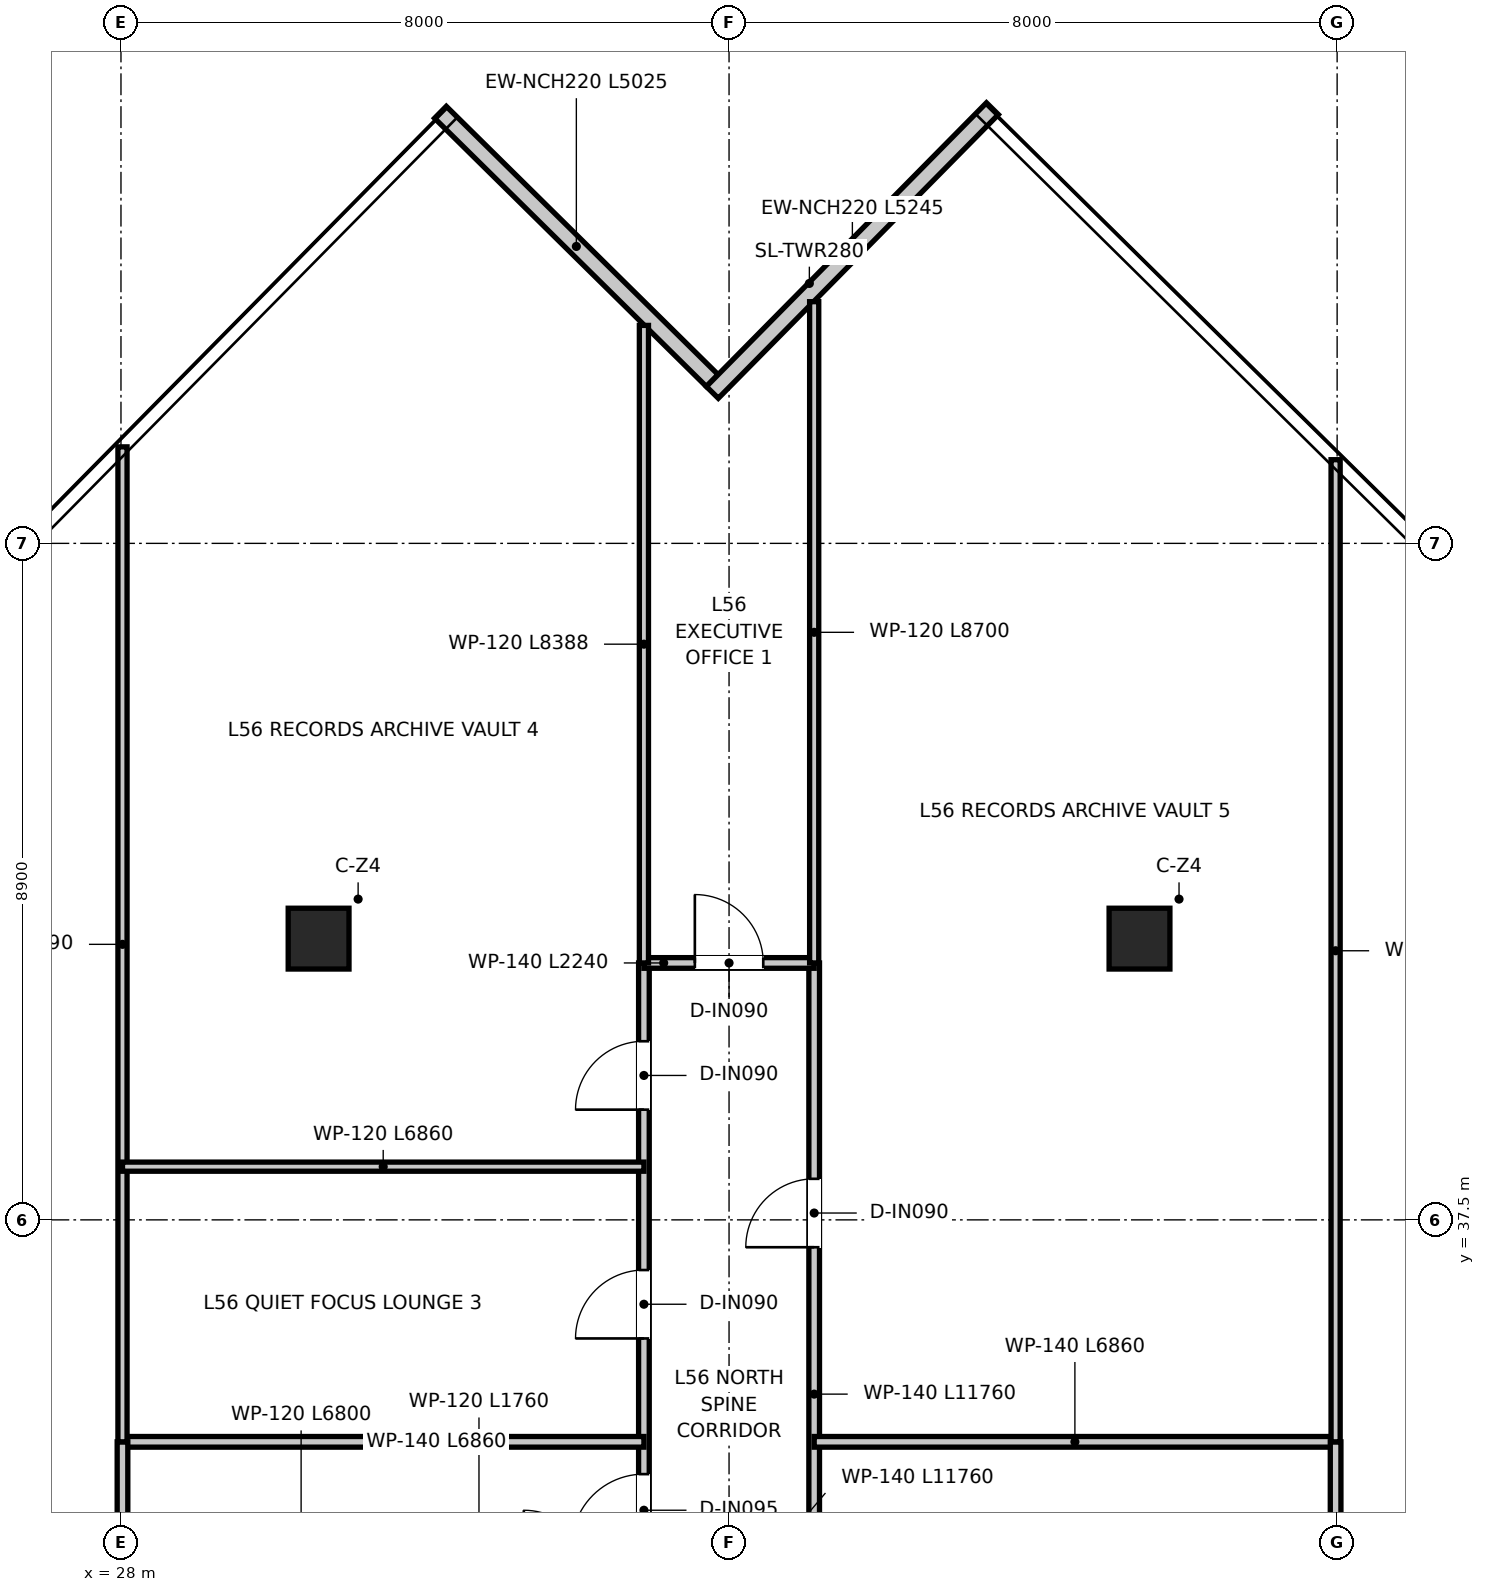
"""IFC4 building model, lengths in metres.
Left out: names, types, materials, properties, quantities, classifications, styles, units other than length and angle.
Written with IfcOpenShell. Run it as: python <this file> out.ifc"""

import sys

from ifc_helpers import new_model, si_unit, direction, frame, frame_2d, origin, origin_2d, place, context, subcontext, project, spatial, rectangle, extrude, source, transform, mapped, element, fill, save


model = new_model("IFC4")
c1 = context("Model", 3, precision=1e-05, world=origin(), true_north=direction((0.0, 1.0)))
c2 = subcontext(c1, "Body", "Model", "MODEL_VIEW")
j1 = project(units=[si_unit("LENGTHUNIT", "METRE"), si_unit("PLANEANGLEUNIT", "RADIAN")], contexts=[c1])
p1 = place(None, origin())
s1 = spatial("IfcSite", under=j1, at=p1, CompositionType="ELEMENT")
p2 = place(p1, origin())
s2 = spatial("IfcBuilding", under=s1, at=p2, CompositionType="ELEMENT")
p3 = place(p2, frame((0.0, 0.0, 231.0)))
s3 = spatial("IfcBuildingStorey", under=s2, at=p3, CompositionType="ELEMENT", Elevation=231.0)
m1 = source(origin(), c2, "Body", "SweptSolid", [
    extrude(rectangle(XDim=0.8, YDim=0.8, at=origin_2d()), origin(), (0.0, 0.0, 1.0), 3.95),
])
for number, where, z_axis, x_axis in (
    (1, (30.6, 41.2, 0.0), (0.0, 0.0, 1.0), (1.0, 0.0, 0.0)),
    (2, (41.4, 41.2, 0.0), (0.0, 0.0, 1.0), (1.0, 0.0, 0.0)),
):
    element("IfcColumn", number, at=place(p3, frame(where, z_axis=z_axis, x_axis=x_axis)), inside=s3, PredefinedType="COLUMN", context=c2, shape_type="MappedRepresentation", body=[
        mapped(m1, transform((0.0, 0.0, 0.0), x_axis=(1.0, 0.0, 0.0), y_axis=(0.0, 1.0, 0.0), z_axis=(0.0, 0.0, 1.0), scale=1.0)),
    ])
p4 = place(p3, frame((35.779, 48.542, 0.0), z_axis=(0.0, 0.0, 1.0), x_axis=(-0.711707198953, 0.70247623658, 0.0)))
e3 = element("IfcWall", 3, at=p4, inside=s3, PredefinedType="ELEMENTEDWALL", context=c2, shape_type="SweptSolid", body=[
    extrude(rectangle(XDim=5.025, YDim=0.22, at=frame_2d((2.513, 0.0))), origin(), (0.0, 0.0, 1.0), 3.67),
])
p5 = place(p3, frame((39.465, 52.119, 0.0), z_axis=(0.0, 0.0, 1.0), x_axis=(-0.702460059039, -0.711723166305, 0.0)))
e4 = element("IfcWall", 4, at=p5, inside=s3, PredefinedType="ELEMENTEDWALL", context=c2, shape_type="SweptSolid", body=[
    extrude(rectangle(XDim=5.245, YDim=0.22, at=frame_2d((2.623, 0.0))), origin(), (0.0, 0.0, 1.0), 3.67),
])
p6 = place(p3, frame((34.88, 29.12, 0.0), z_axis=(0.0, 0.0, 1.0), x_axis=(0.0, 1.0, 0.0)))
e5 = element("IfcWall", 5, at=p6, inside=s3, PredefinedType="PARTITIONING", context=c2, shape_type="SweptSolid", body=[
    extrude(rectangle(XDim=11.76, YDim=0.14, at=frame_2d((5.88, 0.0))), origin(), (0.0, 0.0, 1.0), 3.03),
])
p7 = place(p6, frame((4.085, 0.0, 0.0)))
e6 = element("IfcOpeningElement", 6, at=p7, cuts=e5, PredefinedType="OPENING", context=c2, shape_type="SweptSolid", body=[
    extrude(rectangle(XDim=0.95, YDim=2.1, at=frame_2d((0.475, 1.05))), frame((0.0, 0.08, 0.0), z_axis=(0.0, -1.0, 0.0), x_axis=(1.0, 0.0, 0.0)), (0.0, 0.0, 1.0), 0.16),
])
p8 = place(p6, frame((6.82, 0.0, 0.0)))
e7 = element("IfcOpeningElement", 7, at=p8, cuts=e5, PredefinedType="OPENING", context=c2, shape_type="SweptSolid", body=[
    extrude(rectangle(XDim=0.9, YDim=2.1, at=frame_2d((0.45, 1.05))), frame((0.0, 0.08, 0.0), z_axis=(0.0, -1.0, 0.0), x_axis=(1.0, 0.0, 0.0)), (0.0, 0.0, 1.0), 0.16),
])
p9 = place(p6, frame((9.83, 0.0, 0.0)))
e8 = element("IfcOpeningElement", 8, at=p9, cuts=e5, PredefinedType="OPENING", context=c2, shape_type="SweptSolid", body=[
    extrude(rectangle(XDim=0.9, YDim=2.1, at=frame_2d((0.45, 1.05))), frame((0.0, 0.08, 0.0), z_axis=(0.0, -1.0, 0.0), x_axis=(1.0, 0.0, 0.0)), (0.0, 0.0, 1.0), 0.16),
])
p10 = place(p3, frame((37.12, 29.12, 0.0), z_axis=(0.0, 0.0, 1.0), x_axis=(0.0, 1.0, 0.0)))
e9 = element("IfcWall", 9, at=p10, inside=s3, PredefinedType="PARTITIONING", context=c2, shape_type="SweptSolid", body=[
    extrude(rectangle(XDim=11.76, YDim=0.14, at=frame_2d((5.88, 0.0))), origin(), (0.0, 0.0, 1.0), 3.03),
])
p11 = place(p10, frame((3.205, 0.0, 0.0)))
e10 = element("IfcOpeningElement", 10, at=p11, cuts=e9, PredefinedType="OPENING", context=c2, shape_type="SweptSolid", body=[
    extrude(rectangle(XDim=0.95, YDim=2.1, at=frame_2d((0.475, 1.05))), frame((0.0, 0.08, 0.0), z_axis=(0.0, -1.0, 0.0), x_axis=(1.0, 0.0, 0.0)), (0.0, 0.0, 1.0), 0.16),
])
p12 = place(p10, frame((8.02, 0.0, 0.0)))
e11 = element("IfcOpeningElement", 11, at=p12, cuts=e9, PredefinedType="OPENING", context=c2, shape_type="SweptSolid", body=[
    extrude(rectangle(XDim=0.9, YDim=2.1, at=frame_2d((0.45, 1.05))), frame((0.0, 0.08, 0.0), z_axis=(0.0, -1.0, 0.0), x_axis=(1.0, 0.0, 0.0)), (0.0, 0.0, 1.0), 0.16),
])
p13 = place(p3, frame((34.88, 40.88, 0.0), z_axis=(0.0, 0.0, 1.0), x_axis=(1.0, 0.0, 0.0)))
e12 = element("IfcWall", 12, at=p13, inside=s3, PredefinedType="PARTITIONING", context=c2, shape_type="SweptSolid", body=[
    extrude(rectangle(XDim=2.24, YDim=0.14, at=frame_2d((1.12, 0.0))), origin(), (0.0, 0.0, 1.0), 3.67),
])
p14 = place(p13, frame((0.67, 0.0, 0.0)))
e13 = element("IfcOpeningElement", 13, at=p14, cuts=e12, PredefinedType="OPENING", context=c2, shape_type="SweptSolid", body=[
    extrude(rectangle(XDim=0.9, YDim=2.1, at=frame_2d((0.45, 1.05))), frame((0.0, 0.08, 0.0), z_axis=(0.0, -1.0, 0.0), x_axis=(1.0, 0.0, 0.0)), (0.0, 0.0, 1.0), 0.16),
])
for number, where, z_axis, x_axis in (
    (14, (28.02, 34.58, 0.0), (0.0, 0.0, 1.0), (1.0, 0.0, 0.0)),
    (15, (37.12, 34.58, 0.0), (0.0, 0.0, 1.0), (1.0, 0.0, 0.0)),
):
    element("IfcWall", number, at=place(p3, frame(where, z_axis=z_axis, x_axis=x_axis)), inside=s3, PredefinedType="PARTITIONING", context=c2, shape_type="SweptSolid", body=[
        extrude(rectangle(XDim=6.86, YDim=0.14, at=frame_2d((3.43, 0.0))), origin(), (0.0, 0.0, 1.0), 3.18),
    ])
for number, where, z_axis, x_axis in (
    (16, (28.02, 29.12, 0.0), (0.0, 0.0, 1.0), (0.0, 1.0, 0.0)),
    (17, (43.98, 29.12, 0.0), (0.0, 0.0, 1.0), (0.0, 1.0, 0.0)),
):
    element("IfcWall", number, at=place(p3, frame(where, z_axis=z_axis, x_axis=x_axis)), inside=s3, PredefinedType="PARTITIONING", context=c2, shape_type="SweptSolid", body=[
        extrude(rectangle(XDim=5.46, YDim=0.14, at=frame_2d((2.73, 0.0))), origin(), (0.0, 0.0, 1.0), 3.37),
    ])
p15 = place(p3, frame((34.88, 40.88, 0.0), z_axis=(0.0, 0.0, 1.0), x_axis=(0.0, 1.0, 0.0)))
e18 = element("IfcWall", 18, at=p15, inside=s3, PredefinedType="PARTITIONING", context=c2, shape_type="SweptSolid", body=[
    extrude(rectangle(XDim=8.388, YDim=0.12, at=frame_2d((4.194, 0.0))), origin(), (0.0, 0.0, 1.0), 3.28),
])
p16 = place(p3, frame((37.12, 40.88, 0.0), z_axis=(0.0, 0.0, 1.0), x_axis=(0.0, 1.0, 0.0)))
e19 = element("IfcWall", 19, at=p16, inside=s3, PredefinedType="PARTITIONING", context=c2, shape_type="SweptSolid", body=[
    extrude(rectangle(XDim=8.7, YDim=0.12, at=frame_2d((4.35, 0.0))), origin(), (0.0, 0.0, 1.0), 3.28),
])
p17 = place(p3, frame((28.02, 34.58, 0.0), z_axis=(0.0, 0.0, 1.0), x_axis=(0.0, 1.0, 0.0)))
e20 = element("IfcWall", 20, at=p17, inside=s3, PredefinedType="PARTITIONING", context=c2, shape_type="SweptSolid", body=[
    extrude(rectangle(XDim=13.09, YDim=0.12, at=frame_2d((6.545, 0.0))), origin(), (0.0, 0.0, 1.0), 3.03),
])
p18 = place(p3, frame((43.98, 34.58, 0.0), z_axis=(0.0, 0.0, 1.0), x_axis=(0.0, 1.0, 0.0)))
e21 = element("IfcWall", 21, at=p18, inside=s3, PredefinedType="PARTITIONING", context=c2, shape_type="SweptSolid", body=[
    extrude(rectangle(XDim=12.921, YDim=0.12, at=frame_2d((6.46, 0.0))), origin(), (0.0, 0.0, 1.0), 3.03),
])
p19 = place(p3, frame((28.02, 38.2, 0.0), z_axis=(0.0, 0.0, 1.0), x_axis=(1.0, 0.0, 0.0)))
e22 = element("IfcWall", 22, at=p19, inside=s3, PredefinedType="PARTITIONING", context=c2, shape_type="SweptSolid", body=[
    extrude(rectangle(XDim=6.86, YDim=0.12, at=frame_2d((3.43, 0.0))), origin(), (0.0, 0.0, 1.0), 3.18),
])
p20 = place(p7, origin())
e23 = element("IfcDoor", 23, at=p20, inside=s3, OperationType="SINGLE_SWING_LEFT", PredefinedType="DOOR", context=c2, shape_type="SweptSolid", body=[
    extrude(rectangle(XDim=0.95, YDim=2.1, at=frame_2d((0.475, 1.05))), frame((0.0, 0.025, 0.0), z_axis=(0.0, -1.0, 0.0), x_axis=(1.0, 0.0, 0.0)), (0.0, 0.0, 1.0), 0.05),
])
fill(e6, e23)
p21 = place(p14, origin())
e24 = element("IfcDoor", 24, at=p21, inside=s3, OperationType="SINGLE_SWING_LEFT", PredefinedType="DOOR", context=c2, shape_type="SweptSolid", body=[
    extrude(rectangle(XDim=0.9, YDim=2.1, at=frame_2d((0.45, 1.05))), frame((0.0, 0.025, 0.0), z_axis=(0.0, -1.0, 0.0), x_axis=(1.0, 0.0, 0.0)), (0.0, 0.0, 1.0), 0.05),
])
fill(e13, e24)
p22 = place(p8, origin())
e25 = element("IfcDoor", 25, at=p22, inside=s3, OperationType="SINGLE_SWING_LEFT", PredefinedType="DOOR", context=c2, shape_type="SweptSolid", body=[
    extrude(rectangle(XDim=0.9, YDim=2.1, at=frame_2d((0.45, 1.05))), frame((0.0, 0.025, 0.0), z_axis=(0.0, -1.0, 0.0), x_axis=(1.0, 0.0, 0.0)), (0.0, 0.0, 1.0), 0.05),
])
fill(e7, e25)
p23 = place(p9, origin())
e26 = element("IfcDoor", 26, at=p23, inside=s3, OperationType="SINGLE_SWING_LEFT", PredefinedType="DOOR", context=c2, shape_type="SweptSolid", body=[
    extrude(rectangle(XDim=0.9, YDim=2.1, at=frame_2d((0.45, 1.05))), frame((0.0, 0.025, 0.0), z_axis=(0.0, -1.0, 0.0), x_axis=(1.0, 0.0, 0.0)), (0.0, 0.0, 1.0), 0.05),
])
fill(e8, e26)
p24 = place(p12, origin())
e27 = element("IfcDoor", 27, at=p24, inside=s3, OperationType="SINGLE_SWING_LEFT", PredefinedType="DOOR", context=c2, shape_type="SweptSolid", body=[
    extrude(rectangle(XDim=0.9, YDim=2.1, at=frame_2d((0.45, 1.05))), frame((0.0, 0.025, 0.0), z_axis=(0.0, -1.0, 0.0), x_axis=(1.0, 0.0, 0.0)), (0.0, 0.0, 1.0), 0.05),
])
fill(e11, e27)
save(model, sys.argv[1])
